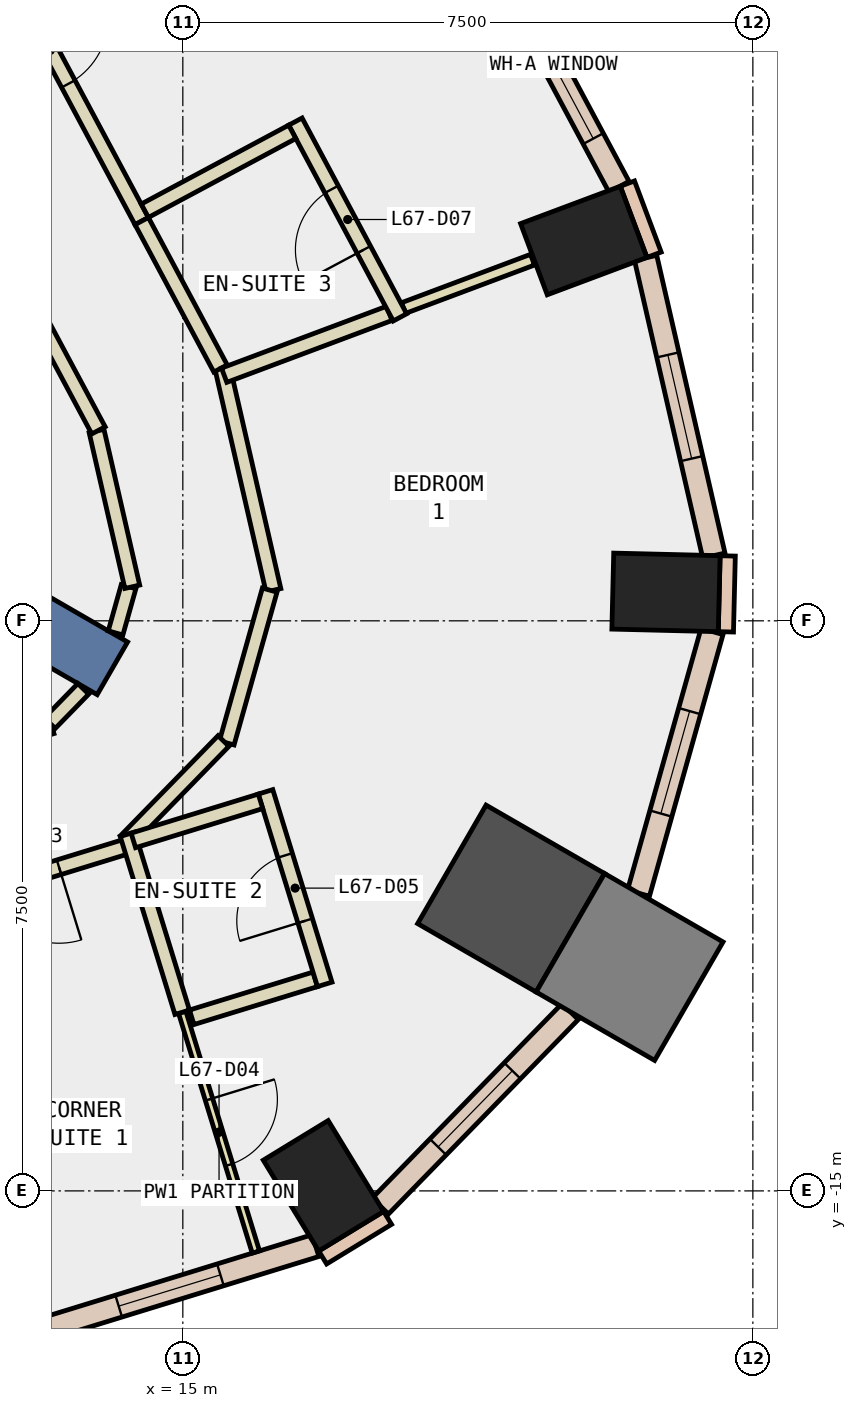
"""IFC4 building model, lengths in metres.
Left out: names, types, materials, properties, quantities, classifications, styles, units other than length and angle.
Written with IfcOpenShell. Run it as: python <this file> out.ifc"""

import sys

from ifc_helpers import new_model, si_unit, direction, frame, frame_2d, origin, origin_2d, place, context, subcontext, project, spatial, rectangle, extrude, element, fill, save


model = new_model("IFC4")
c1 = context("Model", 3, precision=1e-05, world=origin(), true_north=direction((0.0, 1.0)))
c2 = subcontext(c1, "Body", "Model", "MODEL_VIEW")
j1 = project(units=[si_unit("LENGTHUNIT", "METRE"), si_unit("PLANEANGLEUNIT", "RADIAN")], contexts=[c1])
p1 = place(None, origin())
s1 = spatial("IfcSite", under=j1, at=p1, CompositionType="ELEMENT")
p2 = place(p1, origin())
s2 = spatial("IfcBuilding", under=s1, at=p2, CompositionType="ELEMENT")
p3 = place(p2, frame((0.0, 0.0, 290.0)))
s3 = spatial("IfcBuildingStorey", under=s2, at=p3, CompositionType="ELEMENT", Elevation=290.0)
p4 = place(p3, frame((16.85, -14.933, -0.34), z_axis=(0.0, 0.0, 1.0), x_axis=(0.853650808213, 0.520845752251, 0.0)))
e1 = element("IfcColumn", 1, at=p4, inside=s3, PredefinedType="COLUMN", context=c2, shape_type="SweptSolid", body=[
    extrude(rectangle(XDim=1.0, YDim=1.4, at=origin_2d()), origin(), (0.0, 0.0, 1.0), 3.6),
])
p5 = place(p3, frame((19.319, -11.154, -0.34), z_axis=(0.0, 0.0, 1.0), x_axis=(-0.866025403784, 0.5, 0.0)))
e2 = element("IfcColumn", 2, at=p5, inside=s3, PredefinedType="COLUMN", context=c2, shape_type="SweptSolid", body=[
    extrude(rectangle(XDim=1.8, YDim=1.8, at=origin_2d()), origin(), (0.0, 0.0, 1.0), 3.6),
])
for number, where, z_axis, x_axis in (
    (3, (21.357, -7.126, -0.34), (0.0, 0.0, 1.0), (0.024, 1.0, 0.0)),
    (4, (20.275, -2.497, -0.34), (0.0, 0.0, 1.0), (-0.351, 0.936, 0.0)),
):
    element("IfcColumn", number, at=place(p3, frame(where, z_axis=z_axis, x_axis=x_axis)), inside=s3, PredefinedType="COLUMN", context=c2, shape_type="SweptSolid", body=[
        extrude(rectangle(XDim=1.0, YDim=1.4, at=origin_2d()), origin(), (0.0, 0.0, 1.0), 3.6),
    ])
p6 = place(p3, frame((20.878, -12.054, -0.34), z_axis=(0.0, 0.0, 1.0), x_axis=(-0.866025403784, 0.5, 0.0)))
e5 = element("IfcColumn", 5, at=p6, inside=s3, PredefinedType="COLUMN", context=c2, shape_type="SweptSolid", body=[
    extrude(rectangle(XDim=1.8, YDim=1.8, at=origin_2d()), origin(), (0.0, 0.0, 1.0), 3.6),
])
p7 = place(p3, frame((6.279, -3.625, -0.34), z_axis=(0.0, 0.0, 1.0), x_axis=(0.866017533419, -0.500013631625, 0.0)))
e6 = element("IfcWall", 6, at=p7, inside=s3, PredefinedType="SHEAR", context=c2, shape_type="SweptSolid", body=[
    extrude(rectangle(XDim=9.0, YDim=0.8, at=frame_2d((4.5, 0.0))), origin(), (0.0, 0.0, 1.0), 3.6),
])
p8 = place(p3, frame((21.2, -2.684, 0.0), z_axis=(0.0, 0.0, 1.0), x_axis=(-0.350962844851, 0.936389385637, 0.0)))
e7 = element("IfcWall", 7, at=p8, inside=s3, PredefinedType="STANDARD", context=c2, shape_type="SweptSolid", body=[
    extrude(rectangle(XDim=1.0, YDim=0.2, at=frame_2d((0.5, 0.0))), origin(), (0.0, 0.0, 1.0), 3.26),
])
p9 = place(p3, frame((16.84, -15.876, 0.0), z_axis=(0.0, 0.0, 1.0), x_axis=(0.853679739553, 0.520798331677, 0.0)))
e8 = element("IfcWall", 8, at=p9, inside=s3, PredefinedType="STANDARD", context=c2, shape_type="SweptSolid", body=[
    extrude(rectangle(XDim=1.0, YDim=0.2, at=frame_2d((0.5, 0.0))), origin(), (0.0, 0.0, 1.0), 3.26),
])
p10 = place(p3, frame((22.145, -7.645, 0.0), z_axis=(0.0, 0.0, 1.0), x_axis=(0.023942303888, 0.999713341956, 0.0)))
e9 = element("IfcWall", 9, at=p10, inside=s3, PredefinedType="STANDARD", context=c2, shape_type="SweptSolid", body=[
    extrude(rectangle(XDim=0.999, YDim=0.2, at=frame_2d((0.5, 0.0))), origin(), (0.0, 0.0, 1.0), 3.26),
])
p11 = place(p3, frame((12.904, -16.901, 0.0), z_axis=(0.0, 0.0, 1.0), x_axis=(0.955866957005, 0.293799864716, 0.0)))
e10 = element("IfcWall", 10, at=p11, inside=s3, PredefinedType="STANDARD", context=c2, shape_type="SweptSolid", body=[
    extrude(rectangle(XDim=4.02, YDim=0.3, at=frame_2d((2.01, 0.0))), origin(), (0.0, 0.0, 1.0), 3.26),
])
p12 = place(p11, frame((1.31, 0.0, 0.9)))
e11 = element("IfcOpeningElement", 11, at=p12, cuts=e10, PredefinedType="OPENING", context=c2, shape_type="SweptSolid", body=[
    extrude(rectangle(XDim=1.4, YDim=2.0, at=frame_2d((0.7, 1.0))), frame((0.0, 0.16, 0.0), z_axis=(0.0, -1.0, 0.0), x_axis=(1.0, 0.0, 0.0)), (0.0, 0.0, 1.0), 0.32),
])
p13 = place(p3, frame((17.598, -15.2, 0.0), z_axis=(0.0, 0.0, 1.0), x_axis=(0.698555868355, 0.715555517614, 0.0)))
e12 = element("IfcWall", 12, at=p13, inside=s3, PredefinedType="STANDARD", context=c2, shape_type="SweptSolid", body=[
    extrude(rectangle(XDim=3.576, YDim=0.3, at=frame_2d((1.788, 0.0))), origin(), (0.0, 0.0, 1.0), 3.26),
])
p14 = place(p13, frame((1.088, 0.0, 0.9)))
e13 = element("IfcOpeningElement", 13, at=p14, cuts=e12, PredefinedType="OPENING", context=c2, shape_type="SweptSolid", body=[
    extrude(rectangle(XDim=1.4, YDim=2.0, at=frame_2d((0.7, 1.0))), frame((0.0, 0.16, 0.0), z_axis=(0.0, -1.0, 0.0), x_axis=(1.0, 0.0, 0.0)), (0.0, 0.0, 1.0), 0.32),
])
p15 = place(p3, frame((20.995, -11.083, 0.0), z_axis=(0.0, 0.0, 1.0), x_axis=(0.270589405397, 0.962694849725, 0.0)))
e14 = element("IfcWall", 14, at=p15, inside=s3, PredefinedType="STANDARD", context=c2, shape_type="SweptSolid", body=[
    extrude(rectangle(XDim=3.577, YDim=0.3, at=frame_2d((1.788, 0.0))), origin(), (0.0, 0.0, 1.0), 3.26),
])
p16 = place(p15, frame((1.088, 0.0, 0.9)))
e15 = element("IfcOpeningElement", 15, at=p16, cuts=e14, PredefinedType="OPENING", context=c2, shape_type="SweptSolid", body=[
    extrude(rectangle(XDim=1.4, YDim=2.0, at=frame_2d((0.7, 1.0))), frame((0.0, 0.16, 0.0), z_axis=(0.0, -1.0, 0.0), x_axis=(1.0, 0.0, 0.0)), (0.0, 0.0, 1.0), 0.32),
])
p17 = place(p3, frame((21.987, -6.642, 0.0), z_axis=(0.0, 0.0, 1.0), x_axis=(-0.223448307338, 0.974715781112, 0.0)))
e16 = element("IfcWall", 16, at=p17, inside=s3, PredefinedType="STANDARD", context=c2, shape_type="SweptSolid", body=[
    extrude(rectangle(XDim=4.019, YDim=0.3, at=frame_2d((2.009, 0.0))), origin(), (0.0, 0.0, 1.0), 3.26),
])
p18 = place(p17, frame((1.309, 0.0, 0.9)))
e17 = element("IfcOpeningElement", 17, at=p18, cuts=e16, PredefinedType="OPENING", context=c2, shape_type="SweptSolid", body=[
    extrude(rectangle(XDim=1.4, YDim=2.0, at=frame_2d((0.7, 1.0))), frame((0.0, 0.16, 0.0), z_axis=(0.0, -1.0, 0.0), x_axis=(1.0, 0.0, 0.0)), (0.0, 0.0, 1.0), 0.32),
])
p19 = place(p3, frame((20.739, -1.79, 0.0), z_axis=(0.0, 0.0, 1.0), x_axis=(-0.471789353675, 0.881711293882, 0.0)))
e18 = element("IfcWall", 18, at=p19, inside=s3, PredefinedType="STANDARD", context=c2, shape_type="SweptSolid", body=[
    extrude(rectangle(XDim=7.277, YDim=0.3, at=frame_2d((3.638, 0.0))), origin(), (0.0, 0.0, 1.0), 3.26),
])
p20 = place(p19, frame((0.719, 0.0, 0.9)))
e19 = element("IfcOpeningElement", 19, at=p20, cuts=e18, PredefinedType="OPENING", context=c2, shape_type="SweptSolid", body=[
    extrude(rectangle(XDim=2.2, YDim=2.0, at=frame_2d((1.1, 1.0))), frame((0.0, 0.16, 0.0), z_axis=(0.0, -1.0, 0.0), x_axis=(1.0, 0.0, 0.0)), (0.0, 0.0, 1.0), 0.32),
])
p21 = place(p19, frame((4.358, 0.0, 0.9)))
e20 = element("IfcOpeningElement", 20, at=p21, cuts=e18, PredefinedType="OPENING", context=c2, shape_type="SweptSolid", body=[
    extrude(rectangle(XDim=2.2, YDim=2.0, at=frame_2d((1.1, 1.0))), frame((0.0, 0.16, 0.0), z_axis=(0.0, -1.0, 0.0), x_axis=(1.0, 0.0, 0.0)), (0.0, 0.0, 1.0), 0.32),
])
p22 = place(p3, frame((11.239, -9.514, 0.0), z_axis=(0.0, 0.0, 1.0), x_axis=(0.955838469047, 0.293892533234, 0.0)))
e21 = element("IfcWall", 21, at=p22, inside=s3, PredefinedType="PARTITIONING", context=c2, shape_type="SweptSolid", body=[
    extrude(rectangle(XDim=2.13, YDim=0.2, at=frame_2d((1.065, 0.0))), origin(), (0.0, 0.0, 1.0), 3.26),
])
p23 = place(p3, frame((13.25, -8.846, 0.0), z_axis=(0.0, 0.0, 1.0), x_axis=(0.698333537371, 0.715772499181, 0.0)))
e22 = element("IfcWall", 22, at=p23, inside=s3, PredefinedType="PARTITIONING", context=c2, shape_type="SweptSolid", body=[
    extrude(rectangle(XDim=0.63, YDim=0.2, at=frame_2d((0.315, 0.0))), origin(), (0.0, 0.0, 1.0), 3.26),
])
p24 = place(p3, frame((14.115, -7.659, 0.0), z_axis=(0.0, 0.0, 1.0), x_axis=(0.270633612894, 0.96268242301, 0.0)))
e23 = element("IfcWall", 23, at=p24, inside=s3, PredefinedType="PARTITIONING", context=c2, shape_type="SweptSolid", body=[
    extrude(rectangle(XDim=0.632, YDim=0.2, at=frame_2d((0.316, 0.0))), origin(), (0.0, 0.0, 1.0), 3.26),
])
p25 = place(p3, frame((14.335, -7.052, 0.0), z_axis=(0.0, 0.0, 1.0), x_axis=(-0.22355315143, 0.974691740237, 0.0)))
e24 = element("IfcWall", 24, at=p25, inside=s3, PredefinedType="PARTITIONING", context=c2, shape_type="SweptSolid", body=[
    extrude(rectangle(XDim=2.102, YDim=0.2, at=frame_2d((1.051, 0.0))), origin(), (0.0, 0.0, 1.0), 3.26),
])
p26 = place(p3, frame((13.89, -4.994, 0.0), z_axis=(0.0, 0.0, 1.0), x_axis=(-0.471713767504, 0.881751734644, 0.0)))
e25 = element("IfcWall", 25, at=p26, inside=s3, PredefinedType="PARTITIONING", context=c2, shape_type="SweptSolid", body=[
    extrude(rectangle(XDim=7.248, YDim=0.2, at=frame_2d((3.624, 0.0))), origin(), (0.0, 0.0, 1.0), 3.26),
])
p27 = place(p26, frame((2.724, 0.0, 0.0)))
e26 = element("IfcOpeningElement", 26, at=p27, cuts=e25, PredefinedType="OPENING", context=c2, shape_type="SweptSolid", body=[
    extrude(rectangle(XDim=1.8, YDim=2.1, at=frame_2d((0.9, 1.05))), frame((0.0, 0.11, 0.0), z_axis=(0.0, -1.0, 0.0), x_axis=(1.0, 0.0, 0.0)), (0.0, 0.0, 1.0), 0.22),
])
p28 = place(p3, frame((14.243, -10.474, 0.0), z_axis=(0.0, 0.0, 1.0), x_axis=(-0.955937788993, -0.293569316475, 0.0)))
e27 = element("IfcWall", 27, at=p28, inside=s3, PredefinedType="PARTITIONING", context=c2, shape_type="SweptSolid", body=[
    extrude(rectangle(XDim=2.823, YDim=0.2, at=frame_2d((1.412, 0.0))), origin(), (0.0, 0.0, 1.0), 3.26),
])
p29 = place(p28, frame((0.912, 0.0, 0.0)))
e28 = element("IfcOpeningElement", 28, at=p29, cuts=e27, PredefinedType="OPENING", context=c2, shape_type="SweptSolid", body=[
    extrude(rectangle(XDim=1.0, YDim=2.1, at=frame_2d((0.5, 1.05))), frame((0.0, 0.11, 0.0), z_axis=(0.0, -1.0, 0.0), x_axis=(1.0, 0.0, 0.0)), (0.0, 0.0, 1.0), 0.22),
])
p30 = place(p3, frame((15.521, -4.171, 0.0), z_axis=(0.0, 0.0, 1.0), x_axis=(0.223416387785, -0.974723097946, 0.0)))
e29 = element("IfcWall", 29, at=p30, inside=s3, PredefinedType="PARTITIONING", context=c2, shape_type="SweptSolid", body=[
    extrude(rectangle(XDim=3.003, YDim=0.2, at=frame_2d((1.501, 0.0))), origin(), (0.0, 0.0, 1.0), 3.26),
])
p31 = place(p3, frame((16.143, -7.096, 0.0), z_axis=(0.0, 0.0, 1.0), x_axis=(-0.270688011946, -0.962667128445, 0.0)))
e30 = element("IfcWall", 30, at=p31, inside=s3, PredefinedType="PARTITIONING", context=c2, shape_type="SweptSolid", body=[
    extrude(rectangle(XDim=2.088, YDim=0.2, at=frame_2d((1.044, 0.0))), origin(), (0.0, 0.0, 1.0), 3.26),
])
p32 = place(p3, frame((15.535, -9.081, 0.0), z_axis=(0.0, 0.0, 1.0), x_axis=(-0.698342132704, -0.715764113162, 0.0)))
e31 = element("IfcWall", 31, at=p32, inside=s3, PredefinedType="PARTITIONING", context=c2, shape_type="SweptSolid", body=[
    extrude(rectangle(XDim=1.836, YDim=0.2, at=frame_2d((0.918, 0.0))), origin(), (0.0, 0.0, 1.0), 3.26),
])
p33 = place(p3, frame((12.009, 2.338, 0.0), z_axis=(0.0, 0.0, 1.0), x_axis=(0.471771260231, -0.88172097515, 0.0)))
e32 = element("IfcWall", 32, at=p33, inside=s3, PredefinedType="PARTITIONING", context=c2, shape_type="SweptSolid", body=[
    extrude(rectangle(XDim=5.193, YDim=0.2, at=frame_2d((2.597, 0.0))), origin(), (0.0, 0.0, 1.0), 3.26),
])
p34 = place(p33, frame((2.146, 0.0, 0.0)))
e33 = element("IfcOpeningElement", 33, at=p34, cuts=e32, PredefinedType="OPENING", context=c2, shape_type="SweptSolid", body=[
    extrude(rectangle(XDim=1.0, YDim=2.1, at=frame_2d((0.5, 1.05))), frame((0.0, 0.11, 0.0), z_axis=(0.0, -1.0, 0.0), x_axis=(1.0, 0.0, 0.0)), (0.0, 0.0, 1.0), 0.22),
])
p35 = place(p3, frame((14.459, -2.241, 0.0), z_axis=(0.0, 0.0, 1.0), x_axis=(0.471648235011, -0.881786789656, 0.0)))
e34 = element("IfcWall", 34, at=p35, inside=s3, PredefinedType="PARTITIONING", context=c2, shape_type="SweptSolid", body=[
    extrude(rectangle(XDim=2.199, YDim=0.2, at=frame_2d((1.1, 0.0))), origin(), (0.0, 0.0, 1.0), 3.26),
])
p36 = place(p3, frame((14.992, -12.65, 0.0), z_axis=(0.0, 0.0, 1.0), x_axis=(0.293675064948, -0.955905307145, 0.0)))
e35 = element("IfcWall", 35, at=p36, inside=s3, PredefinedType="PARTITIONING", context=c2, shape_type="SweptSolid", body=[
    extrude(rectangle(XDim=3.3, YDim=0.1, at=frame_2d((1.65, 0.0))), origin(), (0.0, 0.0, 1.0), 3.26),
])
p37 = place(p36, frame((1.2, 0.0, 0.0)))
e36 = element("IfcOpeningElement", 36, at=p37, cuts=e35, PredefinedType="OPENING", context=c2, shape_type="SweptSolid", body=[
    extrude(rectangle(XDim=0.9, YDim=2.1, at=frame_2d((0.45, 1.05))), frame((0.0, 0.06, 0.0), z_axis=(0.0, -1.0, 0.0), x_axis=(1.0, 0.0, 0.0)), (0.0, 0.0, 1.0), 0.12),
])
p38 = place(p3, frame((14.272, -10.308, 0.0), z_axis=(0.0, 0.0, 1.0), x_axis=(0.293868765171, -0.955845776711, 0.0)))
e37 = element("IfcWall", 37, at=p38, inside=s3, PredefinedType="PARTITIONING", context=c2, shape_type="SweptSolid", body=[
    extrude(rectangle(XDim=2.45, YDim=0.2, at=frame_2d((1.225, 0.0))), origin(), (0.0, 0.0, 1.0), 3.26),
])
p39 = place(p3, frame((15.117, -12.716, 0.0), z_axis=(0.0, 0.0, 1.0), x_axis=(0.955940341053, 0.293561006177, 0.0)))
e38 = element("IfcWall", 38, at=p39, inside=s3, PredefinedType="PARTITIONING", context=c2, shape_type="SweptSolid", body=[
    extrude(rectangle(XDim=1.7, YDim=0.2, at=frame_2d((0.85, 0.0))), origin(), (0.0, 0.0, 1.0), 3.26),
])
p40 = place(p3, frame((16.867, -12.283, 0.0), z_axis=(0.0, 0.0, 1.0), x_axis=(-0.29397579302, 0.955812865114, 0.0)))
e39 = element("IfcWall", 39, at=p40, inside=s3, PredefinedType="PARTITIONING", context=c2, shape_type="SweptSolid", body=[
    extrude(rectangle(XDim=2.65, YDim=0.2, at=frame_2d((1.325, 0.0))), origin(), (0.0, 0.0, 1.0), 3.26),
])
p41 = place(p40, frame((0.875, 0.0, 0.0)))
e40 = element("IfcOpeningElement", 40, at=p41, cuts=e39, PredefinedType="OPENING", context=c2, shape_type="SweptSolid", body=[
    extrude(rectangle(XDim=0.9, YDim=2.1, at=frame_2d((0.45, 1.05))), frame((0.0, 0.11, 0.0), z_axis=(0.0, -1.0, 0.0), x_axis=(1.0, 0.0, 0.0)), (0.0, 0.0, 1.0), 0.22),
])
p42 = place(p3, frame((16.022, -9.875, 0.0), z_axis=(0.0, 0.0, 1.0), x_axis=(-0.955908620472, -0.293664279932, 0.0)))
e41 = element("IfcWall", 41, at=p42, inside=s3, PredefinedType="PARTITIONING", context=c2, shape_type="SweptSolid", body=[
    extrude(rectangle(XDim=1.75, YDim=0.2, at=frame_2d((0.875, 0.0))), origin(), (0.0, 0.0, 1.0), 3.26),
])
p43 = place(p3, frame((17.904, -3.385, 0.0), z_axis=(0.0, 0.0, 1.0), x_axis=(0.936401128709, 0.350931512054, 0.0)))
e42 = element("IfcWall", 42, at=p43, inside=s3, PredefinedType="PARTITIONING", context=c2, shape_type="SweptSolid", body=[
    extrude(rectangle(XDim=1.812, YDim=0.15, at=frame_2d((0.906, 0.0))), origin(), (0.0, 0.0, 1.0), 3.26),
])
p44 = place(p3, frame((15.544, -4.269, 0.0), z_axis=(0.0, 0.0, 1.0), x_axis=(0.936463142424, 0.350765994477, 0.0)))
e43 = element("IfcWall", 43, at=p44, inside=s3, PredefinedType="PARTITIONING", context=c2, shape_type="SweptSolid", body=[
    extrude(rectangle(XDim=2.321, YDim=0.2, at=frame_2d((1.16, 0.0))), origin(), (0.0, 0.0, 1.0), 3.26),
])
p45 = place(p3, frame((17.857, -3.508, 0.0), z_axis=(0.0, 0.0, 1.0), x_axis=(-0.47112614664, 0.882065844454, 0.0)))
e44 = element("IfcWall", 44, at=p45, inside=s3, PredefinedType="PARTITIONING", context=c2, shape_type="SweptSolid", body=[
    extrude(rectangle(XDim=2.921, YDim=0.2, at=frame_2d((1.46, 0.0))), origin(), (0.0, 0.0, 1.0), 3.26),
])
p46 = place(p45, frame((1.01, 0.0, 0.0)))
e45 = element("IfcOpeningElement", 45, at=p46, cuts=e44, PredefinedType="OPENING", context=c2, shape_type="SweptSolid", body=[
    extrude(rectangle(XDim=0.9, YDim=2.1, at=frame_2d((0.45, 1.05))), frame((0.0, 0.11, 0.0), z_axis=(0.0, -1.0, 0.0), x_axis=(1.0, 0.0, 0.0)), (0.0, 0.0, 1.0), 0.22),
])
p47 = place(p3, frame((16.44, -1.067, 0.0), z_axis=(0.0, 0.0, 1.0), x_axis=(-0.881700916894, -0.471808746367, 0.0)))
e46 = element("IfcWall", 46, at=p47, inside=s3, PredefinedType="PARTITIONING", context=c2, shape_type="SweptSolid", body=[
    extrude(rectangle(XDim=2.2, YDim=0.2, at=frame_2d((1.1, 0.0))), origin(), (0.0, 0.0, 1.0), 3.26),
])
p48 = place(p12, origin())
e47 = element("IfcWindow", 47, at=p48, inside=s3, PartitioningType="SINGLE_PANEL", PredefinedType="WINDOW", context=c2, shape_type="SweptSolid", body=[
    extrude(rectangle(XDim=1.4, YDim=2.0, at=frame_2d((0.7, 1.0))), frame((0.0, 0.03, 0.0), z_axis=(0.0, -1.0, 0.0), x_axis=(1.0, 0.0, 0.0)), (0.0, 0.0, 1.0), 0.06),
])
fill(e11, e47)
p49 = place(p14, origin())
e48 = element("IfcWindow", 48, at=p49, inside=s3, PartitioningType="SINGLE_PANEL", PredefinedType="WINDOW", context=c2, shape_type="SweptSolid", body=[
    extrude(rectangle(XDim=1.4, YDim=2.0, at=frame_2d((0.7, 1.0))), frame((0.0, 0.03, 0.0), z_axis=(0.0, -1.0, 0.0), x_axis=(1.0, 0.0, 0.0)), (0.0, 0.0, 1.0), 0.06),
])
fill(e13, e48)
p50 = place(p16, origin())
e49 = element("IfcWindow", 49, at=p50, inside=s3, PartitioningType="SINGLE_PANEL", PredefinedType="WINDOW", context=c2, shape_type="SweptSolid", body=[
    extrude(rectangle(XDim=1.4, YDim=2.0, at=frame_2d((0.7, 1.0))), frame((0.0, 0.03, 0.0), z_axis=(0.0, -1.0, 0.0), x_axis=(1.0, 0.0, 0.0)), (0.0, 0.0, 1.0), 0.06),
])
fill(e15, e49)
p51 = place(p18, origin())
e50 = element("IfcWindow", 50, at=p51, inside=s3, PartitioningType="SINGLE_PANEL", PredefinedType="WINDOW", context=c2, shape_type="SweptSolid", body=[
    extrude(rectangle(XDim=1.4, YDim=2.0, at=frame_2d((0.7, 1.0))), frame((0.0, 0.03, 0.0), z_axis=(0.0, -1.0, 0.0), x_axis=(1.0, 0.0, 0.0)), (0.0, 0.0, 1.0), 0.06),
])
fill(e17, e50)
p52 = place(p20, origin())
e51 = element("IfcWindow", 51, at=p52, inside=s3, PartitioningType="SINGLE_PANEL", PredefinedType="WINDOW", context=c2, shape_type="SweptSolid", body=[
    extrude(rectangle(XDim=2.2, YDim=2.0, at=frame_2d((1.1, 1.0))), frame((0.0, 0.03, 0.0), z_axis=(0.0, -1.0, 0.0), x_axis=(1.0, 0.0, 0.0)), (0.0, 0.0, 1.0), 0.06),
])
fill(e19, e51)
p53 = place(p29, origin())
e52 = element("IfcDoor", 52, at=p53, inside=s3, OperationType="SINGLE_SWING_LEFT", PredefinedType="DOOR", context=c2, shape_type="SweptSolid", body=[
    extrude(rectangle(XDim=1.0, YDim=2.1, at=frame_2d((0.5, 1.05))), frame((0.0, 0.025, 0.0), z_axis=(0.0, -1.0, 0.0), x_axis=(1.0, 0.0, 0.0)), (0.0, 0.0, 1.0), 0.05),
])
fill(e28, e52)
p54 = place(p37, origin())
e53 = element("IfcDoor", 53, at=p54, inside=s3, OperationType="SINGLE_SWING_LEFT", PredefinedType="DOOR", context=c2, shape_type="SweptSolid", body=[
    extrude(rectangle(XDim=0.9, YDim=2.1, at=frame_2d((0.45, 1.05))), frame((0.0, 0.025, 0.0), z_axis=(0.0, -1.0, 0.0), x_axis=(1.0, 0.0, 0.0)), (0.0, 0.0, 1.0), 0.05),
])
fill(e36, e53)
p55 = place(p41, origin())
e54 = element("IfcDoor", 54, at=p55, inside=s3, OperationType="SINGLE_SWING_LEFT", PredefinedType="DOOR", context=c2, shape_type="SweptSolid", body=[
    extrude(rectangle(XDim=0.9, YDim=2.1, at=frame_2d((0.45, 1.05))), frame((0.0, 0.025, 0.0), z_axis=(0.0, -1.0, 0.0), x_axis=(1.0, 0.0, 0.0)), (0.0, 0.0, 1.0), 0.05),
])
fill(e40, e54)
p56 = place(p34, origin())
e55 = element("IfcDoor", 55, at=p56, inside=s3, OperationType="SINGLE_SWING_LEFT", PredefinedType="DOOR", context=c2, shape_type="SweptSolid", body=[
    extrude(rectangle(XDim=1.0, YDim=2.1, at=frame_2d((0.5, 1.05))), frame((0.0, 0.025, 0.0), z_axis=(0.0, -1.0, 0.0), x_axis=(1.0, 0.0, 0.0)), (0.0, 0.0, 1.0), 0.05),
])
fill(e33, e55)
p57 = place(p46, origin())
e56 = element("IfcDoor", 56, at=p57, inside=s3, OperationType="SINGLE_SWING_RIGHT", PredefinedType="DOOR", context=c2, shape_type="SweptSolid", body=[
    extrude(rectangle(XDim=0.9, YDim=2.1, at=frame_2d((0.45, 1.05))), frame((0.0, 0.025, 0.0), z_axis=(0.0, -1.0, 0.0), x_axis=(1.0, 0.0, 0.0)), (0.0, 0.0, 1.0), 0.05),
])
fill(e45, e56)
save(model, sys.argv[1])
